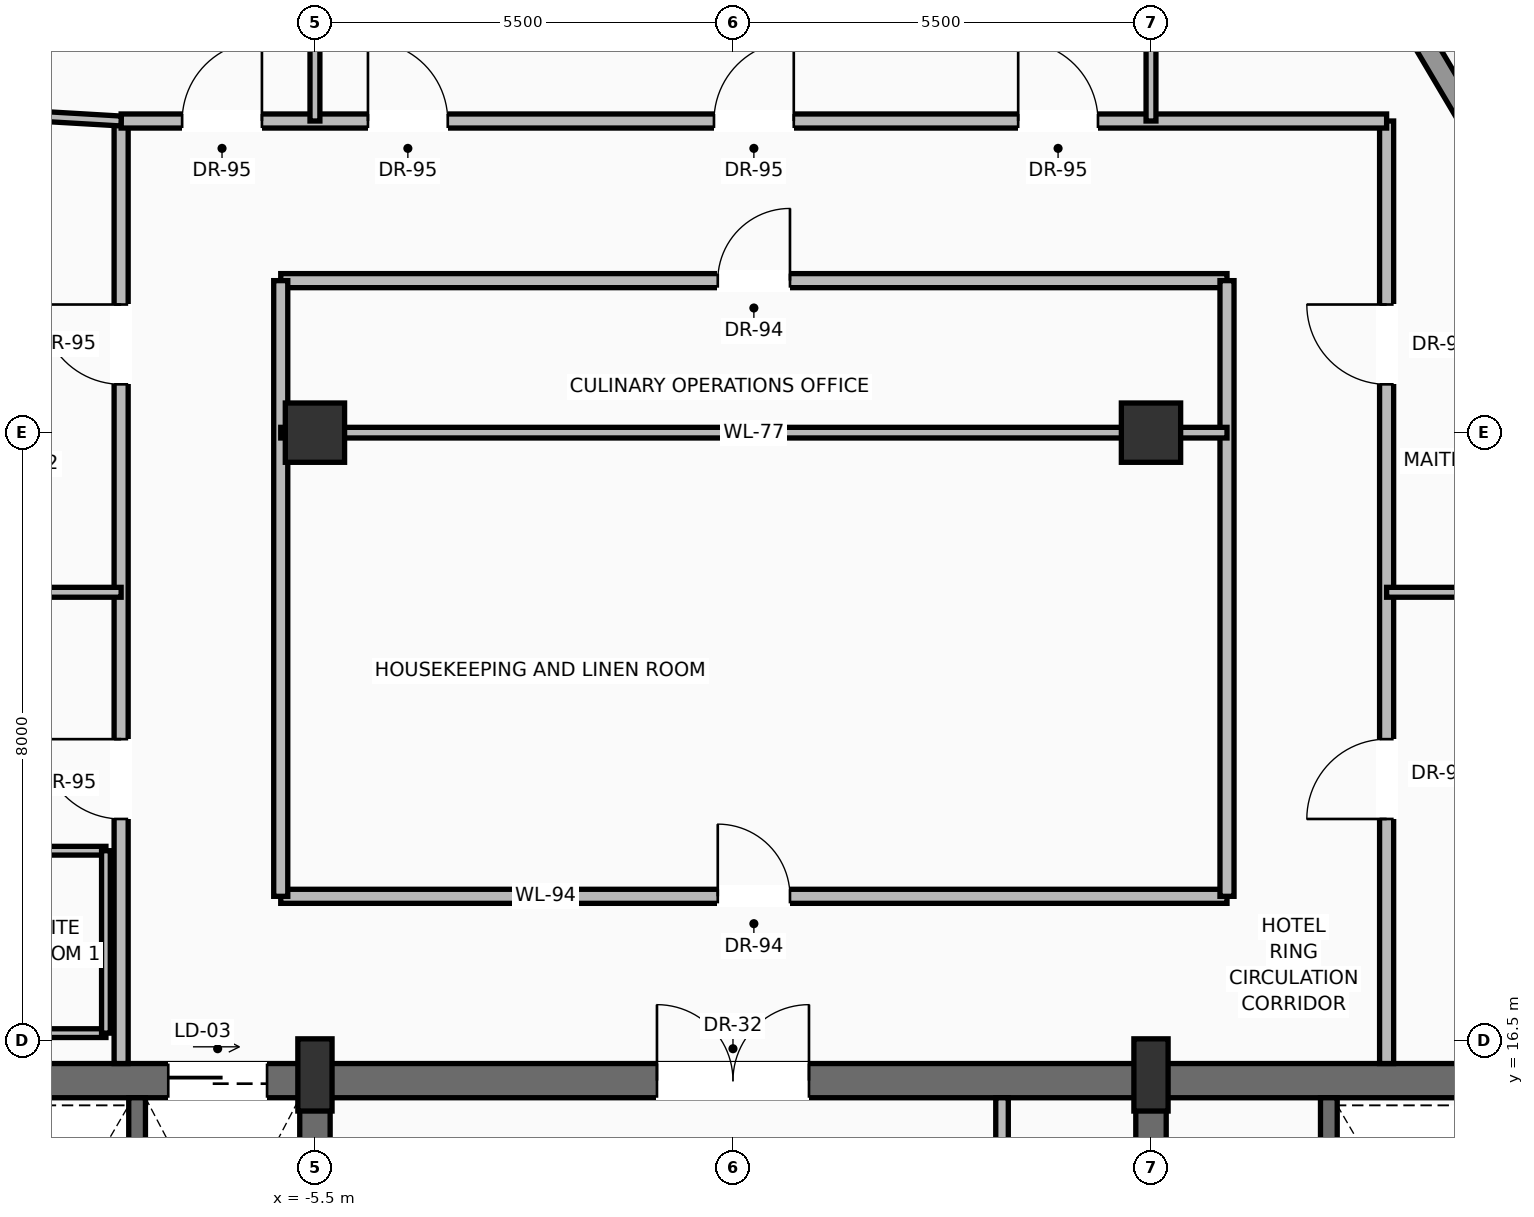
"""IFC4 building model, lengths in metres.
Left out: names, types, materials, properties, quantities, classifications, styles, units other than length and angle.
Written with IfcOpenShell. Run it as: python <this file> out.ifc"""

import sys

from ifc_helpers import new_model, si_unit, direction, frame, frame_2d, origin, origin_2d, place, context, subcontext, project, spatial, rectangle, extrude, source, transform, mapped, element, fill, save


model = new_model("IFC4")
c1 = context("Model", 3, precision=1e-05, world=origin(), true_north=direction((0.0, 1.0)))
c2 = subcontext(c1, "Body", "Model", "MODEL_VIEW")
j1 = project(units=[si_unit("LENGTHUNIT", "METRE"), si_unit("PLANEANGLEUNIT", "RADIAN")], contexts=[c1])
p1 = place(None, origin())
s1 = spatial("IfcSite", under=j1, at=p1, CompositionType="ELEMENT")
p2 = place(p1, origin())
s2 = spatial("IfcBuilding", under=s1, at=p2, CompositionType="ELEMENT")
p3 = place(p2, frame((0.0, 0.0, 276.45)))
s3 = spatial("IfcBuildingStorey", under=s2, at=p3, CompositionType="ELEMENT", Elevation=276.45)
p4 = place(p3, frame((-10.6, 15.975, 0.0), z_axis=(0.0, 0.0, 1.0), x_axis=(1.0, 0.0, 0.0)))
e1 = element("IfcWall", 1, at=p4, inside=s3, PredefinedType="SHEAR", context=c2, shape_type="SweptSolid", body=[
    extrude(rectangle(XDim=21.2, YDim=0.45, at=frame_2d((10.6, 0.0))), origin(), (0.0, 0.0, 1.0), 3.24),
])
p5 = place(p4, frame((3.17, 0.0, 0.0)))
e2 = element("IfcOpeningElement", 2, at=p5, cuts=e1, PredefinedType="OPENING", context=c2, shape_type="SweptSolid", body=[
    extrude(rectangle(XDim=1.3, YDim=2.3, at=frame_2d((0.65, 1.15))), frame((0.0, 0.235, 0.0), z_axis=(0.0, -1.0, 0.0), x_axis=(1.0, 0.0, 0.0)), (0.0, 0.0, 1.0), 0.47),
])
p6 = place(p4, frame((9.6, 0.0, 0.0)))
e3 = element("IfcOpeningElement", 3, at=p6, cuts=e1, PredefinedType="OPENING", context=c2, shape_type="SweptSolid", body=[
    extrude(rectangle(XDim=2.0, YDim=2.4, at=frame_2d((1.0, 1.2))), frame((0.0, 0.235, 0.0), z_axis=(0.0, -1.0, 0.0), x_axis=(1.0, 0.0, 0.0)), (0.0, 0.0, 1.0), 0.47),
])
p7 = place(p3, frame((-5.5, 0.625, 0.0), z_axis=(0.0, 0.0, 1.0), x_axis=(0.0, 1.0, 0.0)))
e4 = element("IfcWall", 4, at=p7, inside=s3, PredefinedType="SHEAR", context=c2, shape_type="SweptSolid", body=[
    extrude(rectangle(XDim=15.35, YDim=0.4, at=frame_2d((7.675, 0.0))), origin(), (0.0, 0.0, 1.0), 3.24),
])
p8 = place(p7, frame((8.875, 0.0, 0.0)))
e5 = element("IfcOpeningElement", 5, at=p8, cuts=e4, PredefinedType="OPENING", context=c2, shape_type="SweptSolid", body=[
    extrude(rectangle(XDim=1.1, YDim=2.2, at=frame_2d((0.55, 1.1))), frame((0.0, 0.21, 0.0), z_axis=(0.0, -1.0, 0.0), x_axis=(1.0, 0.0, 0.0)), (0.0, 0.0, 1.0), 0.42),
])
p9 = place(p3, frame((5.5, 0.625, 0.0), z_axis=(0.0, 0.0, 1.0), x_axis=(0.0, 1.0, 0.0)))
e6 = element("IfcWall", 6, at=p9, inside=s3, PredefinedType="SHEAR", context=c2, shape_type="SweptSolid", body=[
    extrude(rectangle(XDim=15.35, YDim=0.4, at=frame_2d((7.675, 0.0))), origin(), (0.0, 0.0, 1.0), 3.24),
])
p10 = place(p9, frame((8.875, 0.0, 0.0)))
e7 = element("IfcOpeningElement", 7, at=p10, cuts=e6, PredefinedType="OPENING", context=c2, shape_type="SweptSolid", body=[
    extrude(rectangle(XDim=1.1, YDim=2.2, at=frame_2d((0.55, 1.1))), frame((0.0, 0.21, 0.0), z_axis=(0.0, -1.0, 0.0), x_axis=(1.0, 0.0, 0.0)), (0.0, 0.0, 1.0), 0.42),
])
m1 = source(origin(), c2, "Body", "SweptSolid", [
    extrude(rectangle(XDim=0.45, YDim=0.95, at=origin_2d()), origin(), (0.0, 0.0, 1.0), 3.45),
])
for number, where, z_axis, x_axis in (
    (8, (-5.5, 16.05, 0.0), (0.0, 0.0, 1.0), (1.0, 0.0, 0.0)),
    (9, (5.5, 16.05, 0.0), (0.0, 0.0, 1.0), (1.0, 0.0, 0.0)),
):
    element("IfcColumn", number, at=place(p3, frame(where, z_axis=z_axis, x_axis=x_axis)), inside=s3, PredefinedType="PILASTER", context=c2, shape_type="MappedRepresentation", body=[
        mapped(m1, transform((0.0, 0.0, 0.0), scale=1.0)),
    ])
m2 = source(origin(), c2, "Body", "SweptSolid", [
    extrude(rectangle(XDim=0.78, YDim=0.78, at=origin_2d()), origin(), (0.0, 0.0, 1.0), 3.45),
])
for number, where, z_axis, x_axis in (
    (10, (-5.5, 24.5, 0.0), (0.0, 0.0, 1.0), (1.0, 0.0, 0.0)),
    (11, (5.5, 24.5, 0.0), (0.0, 0.0, 1.0), (1.0, 0.0, 0.0)),
):
    element("IfcColumn", number, at=place(p3, frame(where, z_axis=z_axis, x_axis=x_axis)), inside=s3, PredefinedType="COLUMN", context=c2, shape_type="MappedRepresentation", body=[
        mapped(m2, transform((0.0, 0.0, 0.0), scale=1.0)),
    ])
p11 = place(p3, frame((-18.435, 14.229, 0.0), z_axis=(0.0, 0.0, 1.0), x_axis=(0.50006385546, 0.865988533678, 0.0)))
e12 = element("IfcWall", 12, at=p11, inside=s3, PredefinedType="SOLIDWALL", context=c2, shape_type="SweptSolid", body=[
    extrude(rectangle(XDim=20.097, YDim=0.28, at=frame_2d((10.048, 0.0))), origin(), (0.0, 0.0, 1.0), 2.82),
])
p12 = place(p11, frame((4.823, 0.0, 0.0)))
e13 = element("IfcOpeningElement", 13, at=p12, cuts=e12, PredefinedType="OPENING", context=c2, shape_type="SweptSolid", body=[
    extrude(rectangle(XDim=1.6, YDim=2.35, at=frame_2d((0.8, 1.175))), frame((0.0, 0.15, 0.0), z_axis=(0.0, -1.0, 0.0), x_axis=(1.0, 0.0, 0.0)), (0.0, 0.0, 1.0), 0.3),
])
p13 = place(p11, frame((13.666, 0.0, 0.9)))
e14 = element("IfcOpeningElement", 14, at=p13, cuts=e12, PredefinedType="OPENING", context=c2, shape_type="SweptSolid", body=[
    extrude(rectangle(XDim=2.0, YDim=1.75, at=frame_2d((1.0, 0.875))), frame((0.0, 0.15, 0.0), z_axis=(0.0, -1.0, 0.0), x_axis=(1.0, 0.0, 0.0)), (0.0, 0.0, 1.0), 0.3),
])
p14 = place(p3, frame((7.843, 31.747, 0.0), z_axis=(0.0, 0.0, 1.0), x_axis=(0.50967367276, -0.860367797686, 0.0)))
e15 = element("IfcWall", 15, at=p14, inside=s3, PredefinedType="SOLIDWALL", context=c2, shape_type="SweptSolid", body=[
    extrude(rectangle(XDim=20.018, YDim=0.28, at=frame_2d((10.009, 0.0))), origin(), (0.0, 0.0, 1.0), 2.82),
])
p15 = place(p14, frame((4.804, 0.0, 0.0)))
e16 = element("IfcOpeningElement", 16, at=p15, cuts=e15, PredefinedType="OPENING", context=c2, shape_type="SweptSolid", body=[
    extrude(rectangle(XDim=1.6, YDim=2.35, at=frame_2d((0.8, 1.175))), frame((0.0, 0.15, 0.0), z_axis=(0.0, -1.0, 0.0), x_axis=(1.0, 0.0, 0.0)), (0.0, 0.0, 1.0), 0.3),
])
p16 = place(p14, frame((13.612, 0.0, 0.9)))
e17 = element("IfcOpeningElement", 17, at=p16, cuts=e15, PredefinedType="OPENING", context=c2, shape_type="SweptSolid", body=[
    extrude(rectangle(XDim=2.0, YDim=1.75, at=frame_2d((1.0, 0.875))), frame((0.0, 0.15, 0.0), z_axis=(0.0, -1.0, 0.0), x_axis=(1.0, 0.0, 0.0)), (0.0, 0.0, 1.0), 0.3),
])
for number, where, z_axis, x_axis in (
    (18, (-7.84, 11.87, 0.0), (0.0, 0.0, 1.0), (0.0, 1.0, 0.0)),
    (19, (7.84, 11.87, 0.0), (0.0, 0.0, 1.0), (0.0, 1.0, 0.0)),
):
    element("IfcWall", number, at=place(p3, frame(where, z_axis=z_axis, x_axis=x_axis)), inside=s3, PredefinedType="SOLIDWALL", context=c2, shape_type="SweptSolid", body=[
        extrude(rectangle(XDim=3.88, YDim=0.22, at=frame_2d((1.94, 0.0))), origin(), (0.0, 0.0, 1.0), 3.24),
    ])
p17 = place(p3, frame((3.54, 11.22, 0.0), z_axis=(0.0, 0.0, 1.0), x_axis=(0.0, 1.0, 0.0)))
e20 = element("IfcWall", 20, at=p17, inside=s3, PredefinedType="PARTITIONING", context=c2, shape_type="SweptSolid", body=[
    extrude(rectangle(XDim=4.53, YDim=0.165, at=frame_2d((2.265, 0.0))), origin(), (0.0, 0.0, 1.0), 3.232),
])
p18 = place(p17, frame((1.25, 0.0, 0.0)))
e21 = element("IfcOpeningElement", 21, at=p18, cuts=e20, PredefinedType="OPENING", context=c2, shape_type="SweptSolid", body=[
    extrude(rectangle(XDim=0.9, YDim=2.1, at=frame_2d((0.45, 1.05))), frame((0.0, 0.093, 0.0), z_axis=(0.0, -1.0, 0.0), x_axis=(1.0, 0.0, 0.0)), (0.0, 0.0, 1.0), 0.185),
])
p19 = place(p3, frame((-5.95, 18.4, 0.0), z_axis=(0.0, 0.0, 1.0), x_axis=(1.0, 0.0, 0.0)))
e22 = element("IfcWall", 22, at=p19, inside=s3, PredefinedType="PARTITIONING", context=c2, shape_type="SweptSolid", body=[
    extrude(rectangle(XDim=12.45, YDim=0.185, at=frame_2d((6.225, 0.0))), origin(), (0.0, 0.0, 1.0), 3.232),
])
p20 = place(p19, frame((5.75, 0.0, 0.0)))
e23 = element("IfcOpeningElement", 23, at=p20, cuts=e22, PredefinedType="OPENING", context=c2, shape_type="SweptSolid", body=[
    extrude(rectangle(XDim=0.95, YDim=2.2, at=frame_2d((0.475, 1.1))), frame((0.0, 0.103, 0.0), z_axis=(0.0, -1.0, 0.0), x_axis=(1.0, 0.0, 0.0)), (0.0, 0.0, 1.0), 0.205),
])
p21 = place(p3, frame((-5.95, 26.5, 0.0), z_axis=(0.0, 0.0, 1.0), x_axis=(1.0, 0.0, 0.0)))
e24 = element("IfcWall", 24, at=p21, inside=s3, PredefinedType="PARTITIONING", context=c2, shape_type="SweptSolid", body=[
    extrude(rectangle(XDim=12.45, YDim=0.185, at=frame_2d((6.225, 0.0))), origin(), (0.0, 0.0, 1.0), 3.232),
])
p22 = place(p21, frame((5.75, 0.0, 0.0)))
e25 = element("IfcOpeningElement", 25, at=p22, cuts=e24, PredefinedType="OPENING", context=c2, shape_type="SweptSolid", body=[
    extrude(rectangle(XDim=0.95, YDim=2.2, at=frame_2d((0.475, 1.1))), frame((0.0, 0.103, 0.0), z_axis=(0.0, -1.0, 0.0), x_axis=(1.0, 0.0, 0.0)), (0.0, 0.0, 1.0), 0.205),
])
for number, where, z_axis, x_axis in (
    (26, (-5.95, 18.4, 0.0), (0.0, 0.0, 1.0), (0.0, 1.0, 0.0)),
    (27, (6.5, 18.4, 0.0), (0.0, 0.0, 1.0), (0.0, 1.0, 0.0)),
):
    element("IfcWall", number, at=place(p3, frame(where, z_axis=z_axis, x_axis=x_axis)), inside=s3, PredefinedType="PARTITIONING", context=c2, shape_type="SweptSolid", body=[
        extrude(rectangle(XDim=8.1, YDim=0.185, at=frame_2d((4.05, 0.0))), origin(), (0.0, 0.0, 1.0), 3.232),
    ])
p23 = place(p3, frame((-8.05, 16.2, 0.0), z_axis=(0.0, 0.0, 1.0), x_axis=(0.0, 1.0, 0.0)))
e28 = element("IfcWall", 28, at=p23, inside=s3, PredefinedType="PARTITIONING", context=c2, shape_type="SweptSolid", body=[
    extrude(rectangle(XDim=12.4, YDim=0.185, at=frame_2d((6.2, 0.0))), origin(), (0.0, 0.0, 1.0), 3.232),
])
p24 = place(p23, frame((3.218, 0.0, 0.0)))
e29 = element("IfcOpeningElement", 29, at=p24, cuts=e28, PredefinedType="OPENING", context=c2, shape_type="SweptSolid", body=[
    extrude(rectangle(XDim=1.05, YDim=2.25, at=frame_2d((0.525, 1.125))), frame((0.0, 0.103, 0.0), z_axis=(0.0, -1.0, 0.0), x_axis=(1.0, 0.0, 0.0)), (0.0, 0.0, 1.0), 0.205),
])
p25 = place(p23, frame((8.936, 0.0, 0.0)))
e30 = element("IfcOpeningElement", 30, at=p25, cuts=e28, PredefinedType="OPENING", context=c2, shape_type="SweptSolid", body=[
    extrude(rectangle(XDim=1.05, YDim=2.25, at=frame_2d((0.525, 1.125))), frame((0.0, 0.103, 0.0), z_axis=(0.0, -1.0, 0.0), x_axis=(1.0, 0.0, 0.0)), (0.0, 0.0, 1.0), 0.205),
])
p26 = place(p3, frame((8.6, 16.2, 0.0), z_axis=(0.0, 0.0, 1.0), x_axis=(0.0, 1.0, 0.0)))
e31 = element("IfcWall", 31, at=p26, inside=s3, PredefinedType="PARTITIONING", context=c2, shape_type="SweptSolid", body=[
    extrude(rectangle(XDim=12.4, YDim=0.185, at=frame_2d((6.2, 0.0))), origin(), (0.0, 0.0, 1.0), 3.232),
])
p27 = place(p26, frame((3.218, 0.0, 0.0)))
e32 = element("IfcOpeningElement", 32, at=p27, cuts=e31, PredefinedType="OPENING", context=c2, shape_type="SweptSolid", body=[
    extrude(rectangle(XDim=1.05, YDim=2.25, at=frame_2d((0.525, 1.125))), frame((0.0, 0.103, 0.0), z_axis=(0.0, -1.0, 0.0), x_axis=(1.0, 0.0, 0.0)), (0.0, 0.0, 1.0), 0.205),
])
p28 = place(p26, frame((8.936, 0.0, 0.0)))
e33 = element("IfcOpeningElement", 33, at=p28, cuts=e31, PredefinedType="OPENING", context=c2, shape_type="SweptSolid", body=[
    extrude(rectangle(XDim=1.05, YDim=2.25, at=frame_2d((0.525, 1.125))), frame((0.0, 0.103, 0.0), z_axis=(0.0, -1.0, 0.0), x_axis=(1.0, 0.0, 0.0)), (0.0, 0.0, 1.0), 0.205),
])
p29 = place(p3, frame((-8.05, 28.6, 0.0), z_axis=(0.0, 0.0, 1.0), x_axis=(1.0, 0.0, 0.0)))
e34 = element("IfcWall", 34, at=p29, inside=s3, PredefinedType="PARTITIONING", context=c2, shape_type="SweptSolid", body=[
    extrude(rectangle(XDim=16.65, YDim=0.185, at=frame_2d((8.325, 0.0))), origin(), (0.0, 0.0, 1.0), 3.232),
])
p30 = place(p29, frame((3.248, 0.0, 0.0)))
e35 = element("IfcOpeningElement", 35, at=p30, cuts=e34, PredefinedType="OPENING", context=c2, shape_type="SweptSolid", body=[
    extrude(rectangle(XDim=1.05, YDim=2.25, at=frame_2d((0.525, 1.125))), frame((0.0, 0.103, 0.0), z_axis=(0.0, -1.0, 0.0), x_axis=(1.0, 0.0, 0.0)), (0.0, 0.0, 1.0), 0.205),
])
p31 = place(p29, frame((7.8, 0.0, 0.0)))
e36 = element("IfcOpeningElement", 36, at=p31, cuts=e34, PredefinedType="OPENING", context=c2, shape_type="SweptSolid", body=[
    extrude(rectangle(XDim=1.05, YDim=2.25, at=frame_2d((0.525, 1.125))), frame((0.0, 0.103, 0.0), z_axis=(0.0, -1.0, 0.0), x_axis=(1.0, 0.0, 0.0)), (0.0, 0.0, 1.0), 0.205),
])
p32 = place(p29, frame((11.802, 0.0, 0.0)))
e37 = element("IfcOpeningElement", 37, at=p32, cuts=e34, PredefinedType="OPENING", context=c2, shape_type="SweptSolid", body=[
    extrude(rectangle(XDim=1.05, YDim=2.25, at=frame_2d((0.525, 1.125))), frame((0.0, 0.103, 0.0), z_axis=(0.0, -1.0, 0.0), x_axis=(1.0, 0.0, 0.0)), (0.0, 0.0, 1.0), 0.205),
])
p33 = place(p29, frame((0.802, 0.0, 0.0)))
e38 = element("IfcOpeningElement", 38, at=p33, cuts=e34, PredefinedType="OPENING", context=c2, shape_type="SweptSolid", body=[
    extrude(rectangle(XDim=1.05, YDim=2.25, at=frame_2d((0.525, 1.125))), frame((0.0, 0.103, 0.0), z_axis=(0.0, -1.0, 0.0), x_axis=(1.0, 0.0, 0.0)), (0.0, 0.0, 1.0), 0.205),
])
p34 = place(p3, frame((-5.95, 24.5, 0.0), z_axis=(0.0, 0.0, 1.0), x_axis=(1.0, 0.0, 0.0)))
e39 = element("IfcWall", 39, at=p34, inside=s3, PredefinedType="PARTITIONING", context=c2, shape_type="SweptSolid", body=[
    extrude(rectangle(XDim=12.45, YDim=0.14, at=frame_2d((6.225, 0.0))), origin(), (0.0, 0.0, 1.0), 2.683),
])
p35 = place(p3, frame((-10.213, 28.726, 0.0), z_axis=(0.0, 0.0, 1.0), x_axis=(0.998302231297, -0.058246501928, 0.0)))
e40 = element("IfcWall", 40, at=p35, inside=s3, PredefinedType="PARTITIONING", context=c2, shape_type="SweptSolid", body=[
    extrude(rectangle(XDim=2.167, YDim=0.13, at=frame_2d((1.083, 0.0))), origin(), (0.0, 0.0, 1.0), 3.232),
])
p36 = place(p3, frame((-5.5, 28.6, 0.0), z_axis=(0.0, 0.0, 1.0), x_axis=(0.0, 1.0, 0.0)))
e41 = element("IfcWall", 41, at=p36, inside=s3, PredefinedType="PARTITIONING", context=c2, shape_type="SweptSolid", body=[
    extrude(rectangle(XDim=8.289, YDim=0.13, at=frame_2d((4.145, 0.0))), origin(), (0.0, 0.0, 1.0), 2.683),
])
p37 = place(p3, frame((5.5, 28.6, 0.0), z_axis=(0.0, 0.0, 1.0), x_axis=(0.0, 1.0, 0.0)))
e42 = element("IfcWall", 42, at=p37, inside=s3, PredefinedType="PARTITIONING", context=c2, shape_type="SweptSolid", body=[
    extrude(rectangle(XDim=7.357, YDim=0.13, at=frame_2d((3.679, 0.0))), origin(), (0.0, 0.0, 1.0), 2.683),
])
for number, where, z_axis, x_axis in (
    (43, (-10.9, 16.6, 0.0), (0.0, 0.0, 1.0), (1.0, 0.0, 0.0)),
    (44, (-10.9, 19.0, 0.0), (0.0, 0.0, 1.0), (1.0, 0.0, 0.0)),
):
    element("IfcWall", number, at=place(p3, frame(where, z_axis=z_axis, x_axis=x_axis)), inside=s3, PredefinedType="PARTITIONING", context=c2, shape_type="SweptSolid", body=[
        extrude(rectangle(XDim=2.65, YDim=0.115, at=frame_2d((1.325, 0.0))), origin(), (0.0, 0.0, 1.0), 3.232),
    ])
p38 = place(p3, frame((-8.25, 16.6, 0.0), z_axis=(0.0, 0.0, 1.0), x_axis=(0.0, 1.0, 0.0)))
e45 = element("IfcWall", 45, at=p38, inside=s3, PredefinedType="PARTITIONING", context=c2, shape_type="SweptSolid", body=[
    extrude(rectangle(XDim=2.4, YDim=0.115, at=frame_2d((1.2, 0.0))), origin(), (0.0, 0.0, 1.0), 3.232),
])
p39 = place(p3, frame((-13.866, 22.4, 0.0), z_axis=(0.0, 0.0, 1.0), x_axis=(1.0, 0.0, 0.0)))
e46 = element("IfcWall", 46, at=p39, inside=s3, PredefinedType="PARTITIONING", context=c2, shape_type="SweptSolid", body=[
    extrude(rectangle(XDim=5.816, YDim=0.13, at=frame_2d((2.908, 0.0))), origin(), (0.0, 0.0, 1.0), 3.232),
])
p40 = place(p3, frame((8.6, 22.4, 0.0), z_axis=(0.0, 0.0, 1.0), x_axis=(1.0, 0.0, 0.0)))
e47 = element("IfcWall", 47, at=p40, inside=s3, PredefinedType="PARTITIONING", context=c2, shape_type="SweptSolid", body=[
    extrude(rectangle(XDim=4.931, YDim=0.13, at=frame_2d((2.466, 0.0))), origin(), (0.0, 0.0, 1.0), 3.232),
])
m3 = source(origin(), c2, "Body", "SweptSolid", [
    extrude(rectangle(XDim=1.3, YDim=2.3, at=frame_2d((0.65, 1.15))), frame((0.0, 0.025, 0.0), z_axis=(0.0, -1.0, 0.0), x_axis=(1.0, 0.0, 0.0)), (0.0, 0.0, 1.0), 0.05),
])
p41 = place(p5, origin())
e48 = element("IfcDoor", 48, at=p41, inside=s3, OperationType="SLIDING_TO_RIGHT", PredefinedType="DOOR", context=c2, shape_type="MappedRepresentation", body=[
    mapped(m3, transform((0.0, 0.0, 0.0), scale=1.0)),
])
fill(e2, e48)
m4 = source(origin(), c2, "Body", "SweptSolid", [
    extrude(rectangle(XDim=2.0, YDim=2.4, at=frame_2d((1.0, 1.2))), frame((0.0, 0.025, 0.0), z_axis=(0.0, -1.0, 0.0), x_axis=(1.0, 0.0, 0.0)), (0.0, 0.0, 1.0), 0.05),
])
p42 = place(p6, origin())
e49 = element("IfcDoor", 49, at=p42, inside=s3, OperationType="DOUBLE_DOOR_SINGLE_SWING", PredefinedType="DOOR", context=c2, shape_type="MappedRepresentation", body=[
    mapped(m4, transform((0.0, 0.0, 0.0), scale=1.0)),
])
fill(e3, e49)
m5 = source(origin(), c2, "Body", "SweptSolid", [
    extrude(rectangle(XDim=0.95, YDim=2.2, at=frame_2d((0.475, 1.1))), frame((0.0, 0.025, 0.0), z_axis=(0.0, -1.0, 0.0), x_axis=(1.0, 0.0, 0.0)), (0.0, 0.0, 1.0), 0.05),
])
p43 = place(p20, origin())
e50 = element("IfcDoor", 50, at=p43, inside=s3, OperationType="SINGLE_SWING_LEFT", PredefinedType="DOOR", context=c2, shape_type="MappedRepresentation", body=[
    mapped(m5, transform((0.0, 0.0, 0.0), scale=1.0)),
])
fill(e23, e50)
p44 = place(p22, origin())
e51 = element("IfcDoor", 51, at=p44, inside=s3, OperationType="SINGLE_SWING_RIGHT", PredefinedType="DOOR", context=c2, shape_type="MappedRepresentation", body=[
    mapped(m5, transform((0.0, 0.0, 0.0), scale=1.0)),
])
fill(e25, e51)
m6 = source(origin(), c2, "Body", "SweptSolid", [
    extrude(rectangle(XDim=1.05, YDim=2.25, at=frame_2d((0.525, 1.125))), frame((0.0, 0.025, 0.0), z_axis=(0.0, -1.0, 0.0), x_axis=(1.0, 0.0, 0.0)), (0.0, 0.0, 1.0), 0.05),
])
p45 = place(p24, origin())
e52 = element("IfcDoor", 52, at=p45, inside=s3, OperationType="SINGLE_SWING_RIGHT", PredefinedType="DOOR", context=c2, shape_type="MappedRepresentation", body=[
    mapped(m6, transform((0.0, 0.0, 0.0), scale=1.0)),
])
fill(e29, e52)
p46 = place(p25, origin())
e53 = element("IfcDoor", 53, at=p46, inside=s3, OperationType="SINGLE_SWING_RIGHT", PredefinedType="DOOR", context=c2, shape_type="MappedRepresentation", body=[
    mapped(m6, transform((0.0, 0.0, 0.0), scale=1.0)),
])
fill(e30, e53)
p47 = place(p27, origin())
e54 = element("IfcDoor", 54, at=p47, inside=s3, OperationType="SINGLE_SWING_LEFT", PredefinedType="DOOR", context=c2, shape_type="MappedRepresentation", body=[
    mapped(m6, transform((0.0, 0.0, 0.0), scale=1.0)),
])
fill(e32, e54)
p48 = place(p28, origin())
e55 = element("IfcDoor", 55, at=p48, inside=s3, OperationType="SINGLE_SWING_RIGHT", PredefinedType="DOOR", context=c2, shape_type="MappedRepresentation", body=[
    mapped(m6, transform((0.0, 0.0, 0.0), scale=1.0)),
])
fill(e33, e55)
p49 = place(p30, origin())
e56 = element("IfcDoor", 56, at=p49, inside=s3, OperationType="SINGLE_SWING_LEFT", PredefinedType="DOOR", context=c2, shape_type="MappedRepresentation", body=[
    mapped(m6, transform((0.0, 0.0, 0.0), scale=1.0)),
])
fill(e35, e56)
p50 = place(p31, origin())
e57 = element("IfcDoor", 57, at=p50, inside=s3, OperationType="SINGLE_SWING_RIGHT", PredefinedType="DOOR", context=c2, shape_type="MappedRepresentation", body=[
    mapped(m6, transform((0.0, 0.0, 0.0), scale=1.0)),
])
fill(e36, e57)
p51 = place(p32, origin())
e58 = element("IfcDoor", 58, at=p51, inside=s3, OperationType="SINGLE_SWING_LEFT", PredefinedType="DOOR", context=c2, shape_type="MappedRepresentation", body=[
    mapped(m6, transform((0.0, 0.0, 0.0), scale=1.0)),
])
fill(e37, e58)
p52 = place(p33, origin())
e59 = element("IfcDoor", 59, at=p52, inside=s3, OperationType="SINGLE_SWING_RIGHT", PredefinedType="DOOR", context=c2, shape_type="MappedRepresentation", body=[
    mapped(m6, transform((0.0, 0.0, 0.0), scale=1.0)),
])
fill(e38, e59)
save(model, sys.argv[1])
